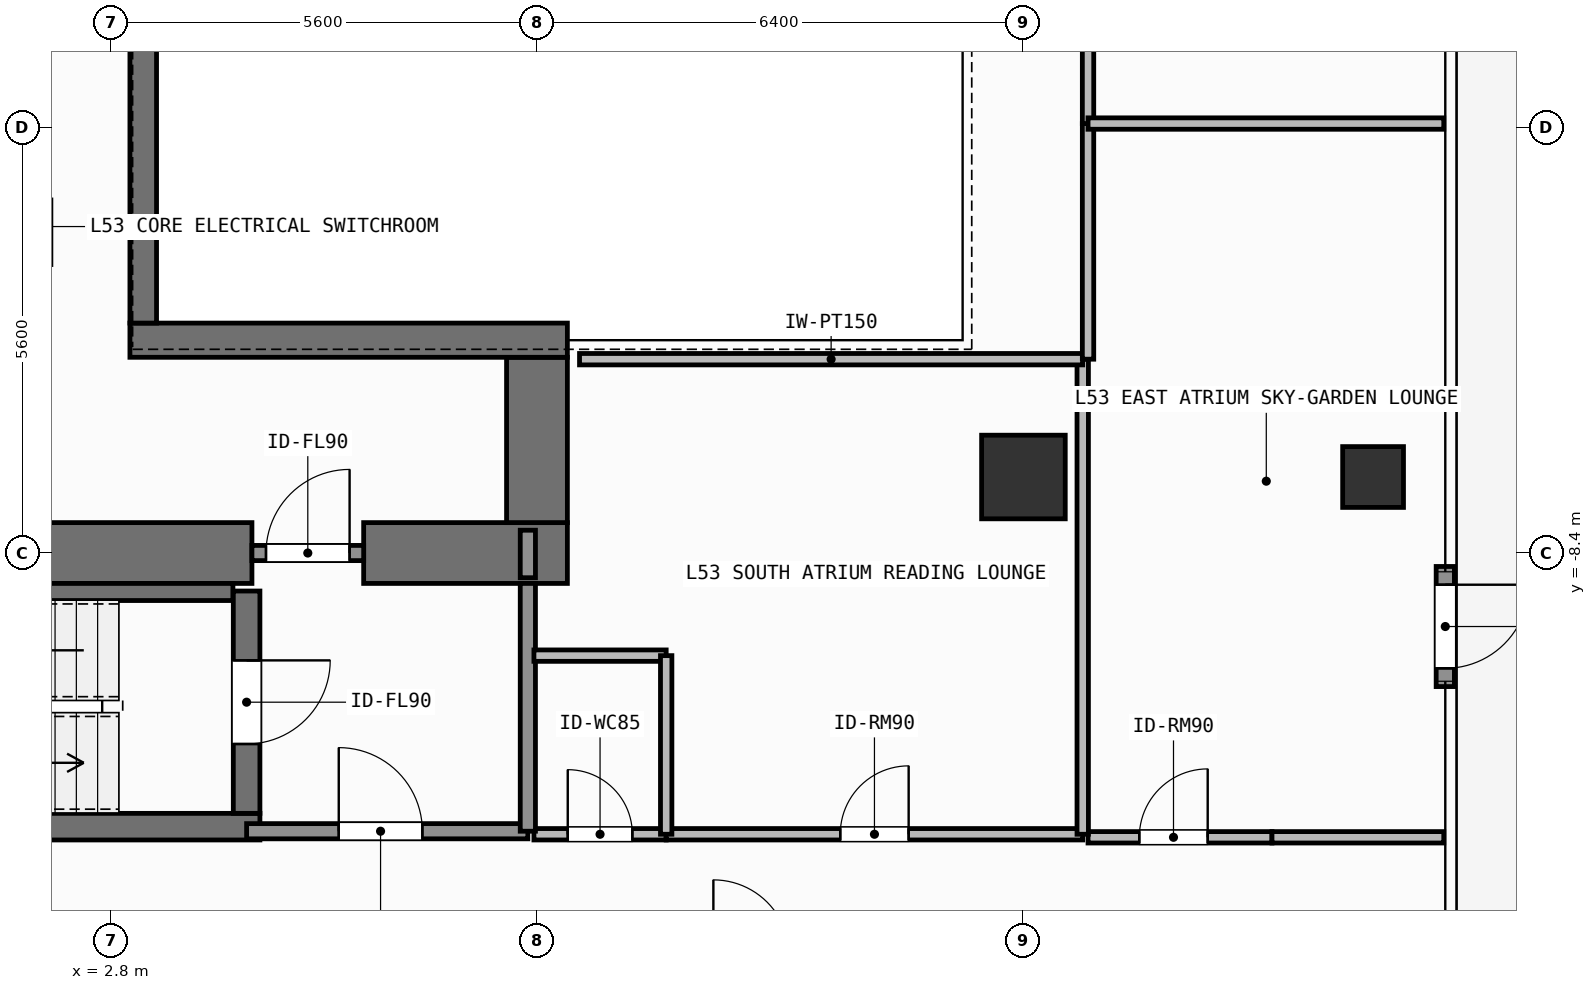
"""IFC4 building model, lengths in metres.
Left out: names, types, materials, properties, quantities, classifications, styles, units other than length and angle.
Written with IfcOpenShell. Run it as: python <this file> out.ifc"""

import sys

from ifc_helpers import new_model, si_unit, direction, frame, frame_2d, origin, origin_2d, place, context, subcontext, project, spatial, rectangle, hollow_rectangle, extrude, element, fill, save


model = new_model("IFC4")
c1 = context("Model", 3, precision=1e-05, world=origin(), true_north=direction((0.0, 1.0)))
c2 = subcontext(c1, "Body", "Model", "MODEL_VIEW")
j1 = project(units=[si_unit("LENGTHUNIT", "METRE"), si_unit("PLANEANGLEUNIT", "RADIAN")], contexts=[c1])
p1 = place(None, origin())
s1 = spatial("IfcSite", under=j1, at=p1, CompositionType="ELEMENT")
p2 = place(p1, origin())
s2 = spatial("IfcBuilding", under=s1, at=p2, CompositionType="ELEMENT")
p3 = place(p2, frame((0.0, 0.0, 215.7)))
s3 = spatial("IfcBuildingStorey", under=s2, at=p3, CompositionType="ELEMENT", Elevation=215.7)
p4 = place(p3, frame((-2.62, -8.4, 0.0), z_axis=(0.0, 0.0, 1.0), x_axis=(1.0, 0.0, 0.0)))
e1 = element("IfcWall", 1, at=p4, inside=s3, PredefinedType="SHEAR", context=c2, shape_type="SweptSolid", body=[
    extrude(rectangle(XDim=7.27, YDim=0.8, at=frame_2d((3.635, 0.0))), origin(), (0.0, 0.0, 1.0), 3.9),
])
p5 = place(p3, frame((6.12, -8.4, 0.0), z_axis=(0.0, 0.0, 1.0), x_axis=(1.0, 0.0, 0.0)))
e2 = element("IfcWall", 2, at=p5, inside=s3, PredefinedType="SHEAR", context=c2, shape_type="SweptSolid", body=[
    extrude(rectangle(XDim=2.68, YDim=0.8, at=frame_2d((1.34, 0.0))), origin(), (0.0, 0.0, 1.0), 3.9),
])
p6 = place(p3, frame((8.4, -8.0, 0.0), z_axis=(0.0, 0.0, 1.0), x_axis=(0.0, 1.0, 0.0)))
e3 = element("IfcWall", 3, at=p6, inside=s3, PredefinedType="SHEAR", context=c2, shape_type="SweptSolid", body=[
    extrude(rectangle(XDim=2.175, YDim=0.8, at=frame_2d((1.087, 0.0))), origin(), (0.0, 0.0, 1.0), 3.9),
])
p7 = place(p3, frame((3.045, -5.6, 0.0), z_axis=(0.0, 0.0, 1.0), x_axis=(1.0, 0.0, 0.0)))
e4 = element("IfcWall", 4, at=p7, inside=s3, PredefinedType="SHEAR", context=c2, shape_type="SweptSolid", body=[
    extrude(rectangle(XDim=5.755, YDim=0.45, at=frame_2d((2.877, 0.0))), origin(), (0.0, 0.0, 1.0), 3.9),
])
p8 = place(p3, frame((3.22, -5.375, 0.0), z_axis=(0.0, 0.0, 1.0), x_axis=(0.0, 1.0, 0.0)))
e5 = element("IfcWall", 5, at=p8, inside=s3, PredefinedType="SHEAR", context=c2, shape_type="SweptSolid", body=[
    extrude(rectangle(XDim=10.75, YDim=0.35, at=frame_2d((5.375, 0.0))), origin(), (0.0, 0.0, 1.0), 3.9),
])
p9 = place(p3, frame((-2.555, -12.0, 0.0), z_axis=(0.0, 0.0, 1.0), x_axis=(1.0, 0.0, 0.0)))
e6 = element("IfcWall", 6, at=p9, inside=s3, PredefinedType="SHEAR", context=c2, shape_type="SweptSolid", body=[
    extrude(rectangle(XDim=7.31, YDim=0.35, at=frame_2d((3.655, 0.0))), origin(), (0.0, 0.0, 1.0), 3.9),
])
p10 = place(p3, frame((-2.2, -8.913, 0.0), z_axis=(0.0, 0.0, 1.0), x_axis=(1.0, 0.0, 0.0)))
e7 = element("IfcWall", 7, at=p10, inside=s3, PredefinedType="SHEAR", context=c2, shape_type="SweptSolid", body=[
    extrude(rectangle(XDim=6.6, YDim=0.225, at=frame_2d((3.3, 0.0))), origin(), (0.0, 0.0, 1.0), 3.9),
])
p11 = place(p3, frame((4.58, -8.9, 0.0), z_axis=(0.0, 0.0, 1.0), x_axis=(0.0, -1.0, 0.0)))
e8 = element("IfcWall", 8, at=p11, inside=s3, PredefinedType="SHEAR", context=c2, shape_type="SweptSolid", body=[
    extrude(rectangle(XDim=2.925, YDim=0.35, at=frame_2d((1.462, 0.0))), origin(), (0.0, 0.0, 1.0), 3.9),
])
p12 = place(p11, frame((0.913, 0.0, 0.0)))
e9 = element("IfcOpeningElement", 9, at=p12, cuts=e8, PredefinedType="OPENING", context=c2, shape_type="SweptSolid", body=[
    extrude(rectangle(XDim=1.1, YDim=2.15, at=frame_2d((0.55, 1.075))), frame((0.0, 0.185, 0.0), z_axis=(0.0, -1.0, 0.0), x_axis=(1.0, 0.0, 0.0)), (0.0, 0.0, 1.0), 0.37),
])
p13 = place(p3, frame((14.8, -7.4, 0.0), z_axis=(0.0, 0.0, 1.0), x_axis=(1.0, 0.0, 0.0)))
e10 = element("IfcColumn", 10, at=p13, inside=s3, PredefinedType="COLUMN", context=c2, shape_type="SweptSolid", body=[
    extrude(rectangle(XDim=1.1, YDim=1.1, at=origin_2d()), origin(), (0.0, 0.0, 1.0), 3.9),
])
p14 = place(p3, frame((19.4, -7.4, 0.0), z_axis=(0.0, 0.0, 1.0), x_axis=(1.0, 0.0, 0.0)))
e11 = element("IfcColumn", 11, at=p14, inside=s3, PredefinedType="COLUMN", context=c2, shape_type="SweptSolid", body=[
    extrude(hollow_rectangle(XDim=0.8, YDim=0.8, WallThickness=0.036, at=origin_2d()), origin(), (0.0, 0.0, 1.0), 3.9),
])
p15 = place(p3, frame((20.35, -8.577, 0.0), z_axis=(0.0, 0.0, 1.0), x_axis=(0.0, -1.0, 0.0)))
e12 = element("IfcWall", 12, at=p15, inside=s3, PredefinedType="SOLIDWALL", context=c2, shape_type="SweptSolid", body=[
    extrude(rectangle(XDim=1.58, YDim=0.24, at=frame_2d((0.79, 0.0))), origin(), (0.0, 0.0, 1.0), 3.62),
])
p16 = place(p15, frame((0.24, 0.0, 0.0)))
e13 = element("IfcOpeningElement", 13, at=p16, cuts=e12, PredefinedType="OPENING", context=c2, shape_type="SweptSolid", body=[
    extrude(rectangle(XDim=1.1, YDim=2.2, at=frame_2d((0.55, 1.1))), frame((0.0, 0.13, 0.0), z_axis=(0.0, -1.0, 0.0), x_axis=(1.0, 0.0, 0.0)), (0.0, 0.0, 1.0), 0.26),
])
p17 = place(p3, frame((4.58, -12.06, 0.0), z_axis=(0.0, 0.0, 1.0), x_axis=(1.0, 0.0, 0.0)))
e14 = element("IfcWall", 14, at=p17, inside=s3, PredefinedType="SOLIDWALL", context=c2, shape_type="SweptSolid", body=[
    extrude(rectangle(XDim=3.7, YDim=0.2, at=frame_2d((1.85, 0.0))), origin(), (0.0, 0.0, 1.0), 3.62),
])
p18 = place(p17, frame((1.212, 0.0, 0.0)))
e15 = element("IfcOpeningElement", 15, at=p18, cuts=e14, PredefinedType="OPENING", context=c2, shape_type="SweptSolid", body=[
    extrude(rectangle(XDim=1.1, YDim=2.15, at=frame_2d((0.55, 1.075))), frame((0.0, 0.11, 0.0), z_axis=(0.0, -1.0, 0.0), x_axis=(1.0, 0.0, 0.0)), (0.0, 0.0, 1.0), 0.22),
])
p19 = place(p3, frame((4.65, -8.4, 0.0), z_axis=(0.0, 0.0, 1.0), x_axis=(1.0, 0.0, 0.0)))
e16 = element("IfcWall", 16, at=p19, inside=s3, PredefinedType="SOLIDWALL", context=c2, shape_type="SweptSolid", body=[
    extrude(rectangle(XDim=1.47, YDim=0.2, at=frame_2d((0.735, 0.0))), origin(), (0.0, 0.0, 1.0), 2.76),
])
p20 = place(p19, frame((0.185, 0.0, 0.0)))
e17 = element("IfcOpeningElement", 17, at=p20, cuts=e16, PredefinedType="OPENING", context=c2, shape_type="SweptSolid", body=[
    extrude(rectangle(XDim=1.1, YDim=2.15, at=frame_2d((0.55, 1.075))), frame((0.0, 0.11, 0.0), z_axis=(0.0, -1.0, 0.0), x_axis=(1.0, 0.0, 0.0)), (0.0, 0.0, 1.0), 0.22),
])
p21 = place(p3, frame((8.36, -12.1, 0.0), z_axis=(0.0, 0.0, 1.0), x_axis=(1.0, 0.0, 0.0)))
e18 = element("IfcWall", 18, at=p21, inside=s3, PredefinedType="PARTITIONING", context=c2, shape_type="SweptSolid", body=[
    extrude(rectangle(XDim=1.74, YDim=0.15, at=frame_2d((0.87, 0.0))), origin(), (0.0, 0.0, 1.0), 3.62),
])
p22 = place(p21, frame((0.445, 0.0, 0.0)))
e19 = element("IfcOpeningElement", 19, at=p22, cuts=e18, PredefinedType="OPENING", context=c2, shape_type="SweptSolid", body=[
    extrude(rectangle(XDim=0.85, YDim=2.1, at=frame_2d((0.425, 1.05))), frame((0.0, 0.085, 0.0), z_axis=(0.0, -1.0, 0.0), x_axis=(1.0, 0.0, 0.0)), (0.0, 0.0, 1.0), 0.17),
])
p23 = place(p3, frame((10.1, -12.1, 0.0), z_axis=(0.0, 0.0, 1.0), x_axis=(1.0, 0.0, 0.0)))
e20 = element("IfcWall", 20, at=p23, inside=s3, PredefinedType="PARTITIONING", context=c2, shape_type="SweptSolid", body=[
    extrude(rectangle(XDim=5.48, YDim=0.15, at=frame_2d((2.74, 0.0))), origin(), (0.0, 0.0, 1.0), 3.62),
])
p24 = place(p23, frame((2.29, 0.0, 0.0)))
e21 = element("IfcOpeningElement", 21, at=p24, cuts=e20, PredefinedType="OPENING", context=c2, shape_type="SweptSolid", body=[
    extrude(rectangle(XDim=0.9, YDim=2.1, at=frame_2d((0.45, 1.05))), frame((0.0, 0.085, 0.0), z_axis=(0.0, -1.0, 0.0), x_axis=(1.0, 0.0, 0.0)), (0.0, 0.0, 1.0), 0.17),
])
p25 = place(p3, frame((15.65, -12.14, 0.0), z_axis=(0.0, 0.0, 1.0), x_axis=(1.0, 0.0, 0.0)))
e22 = element("IfcWall", 22, at=p25, inside=s3, PredefinedType="PARTITIONING", context=c2, shape_type="SweptSolid", body=[
    extrude(rectangle(XDim=2.42, YDim=0.15, at=frame_2d((1.21, 0.0))), origin(), (0.0, 0.0, 1.0), 3.62),
])
p26 = place(p25, frame((0.674, 0.0, 0.0)))
e23 = element("IfcOpeningElement", 23, at=p26, cuts=e22, PredefinedType="OPENING", context=c2, shape_type="SweptSolid", body=[
    extrude(rectangle(XDim=0.9, YDim=2.1, at=frame_2d((0.45, 1.05))), frame((0.0, 0.085, 0.0), z_axis=(0.0, -1.0, 0.0), x_axis=(1.0, 0.0, 0.0)), (0.0, 0.0, 1.0), 0.17),
])
p27 = place(p3, frame((8.28, -12.06, 0.0), z_axis=(0.0, 0.0, 1.0), x_axis=(0.0, 1.0, 0.0)))
e24 = element("IfcWall", 24, at=p27, inside=s3, PredefinedType="SOLIDWALL", context=c2, shape_type="SweptSolid", body=[
    extrude(rectangle(XDim=3.26, YDim=0.2, at=frame_2d((1.63, 0.0))), origin(), (0.0, 0.0, 1.0), 3.62),
])
p28 = place(p3, frame((8.28, -8.725, 0.0), z_axis=(0.0, 0.0, 1.0), x_axis=(0.0, 1.0, 0.0)))
e25 = element("IfcWall", 25, at=p28, inside=s3, PredefinedType="SOLIDWALL", context=c2, shape_type="SweptSolid", body=[
    extrude(rectangle(XDim=0.625, YDim=0.2, at=frame_2d((0.312, 0.0))), origin(), (0.0, 0.0, 1.0), 3.62),
])
p29 = place(p3, frame((8.36, -9.75, 0.0), z_axis=(0.0, 0.0, 1.0), x_axis=(1.0, 0.0, 0.0)))
e26 = element("IfcWall", 26, at=p29, inside=s3, PredefinedType="PARTITIONING", context=c2, shape_type="SweptSolid", body=[
    extrude(rectangle(XDim=1.74, YDim=0.15, at=frame_2d((0.87, 0.0))), origin(), (0.0, 0.0, 1.0), 3.62),
])
p30 = place(p3, frame((10.1, -12.1, 0.0), z_axis=(0.0, 0.0, 1.0), x_axis=(0.0, 1.0, 0.0)))
e27 = element("IfcWall", 27, at=p30, inside=s3, PredefinedType="PARTITIONING", context=c2, shape_type="SweptSolid", body=[
    extrude(rectangle(XDim=2.35, YDim=0.15, at=frame_2d((1.175, 0.0))), origin(), (0.0, 0.0, 1.0), 3.62),
])
p31 = place(p3, frame((15.58, -12.1, 0.0), z_axis=(0.0, 0.0, 1.0), x_axis=(0.0, 1.0, 0.0)))
e28 = element("IfcWall", 28, at=p31, inside=s3, PredefinedType="PARTITIONING", context=c2, shape_type="SweptSolid", body=[
    extrude(rectangle(XDim=6.25, YDim=0.15, at=frame_2d((3.125, 0.0))), origin(), (0.0, 0.0, 1.0), 3.62),
])
p32 = place(p3, frame((8.96, -5.85, 0.0), z_axis=(0.0, 0.0, 1.0), x_axis=(1.0, 0.0, 0.0)))
e29 = element("IfcWall", 29, at=p32, inside=s3, PredefinedType="PARTITIONING", context=c2, shape_type="SweptSolid", body=[
    extrude(rectangle(XDim=6.62, YDim=0.15, at=frame_2d((3.31, 0.0))), origin(), (0.0, 0.0, 1.0), 3.62),
])
p33 = place(p3, frame((15.65, -5.85, 0.0), z_axis=(0.0, 0.0, 1.0), x_axis=(0.0, 1.0, 0.0)))
e30 = element("IfcWall", 30, at=p33, inside=s3, PredefinedType="PARTITIONING", context=c2, shape_type="SweptSolid", body=[
    extrude(rectangle(XDim=3.1, YDim=0.15, at=frame_2d((1.55, 0.0))), origin(), (0.0, 0.0, 1.0), 3.62),
])
p34 = place(p3, frame((15.65, -2.75, 0.0), z_axis=(0.0, 0.0, 1.0), x_axis=(0.0, 1.0, 0.0)))
e31 = element("IfcWall", 31, at=p34, inside=s3, PredefinedType="PARTITIONING", context=c2, shape_type="SweptSolid", body=[
    extrude(rectangle(XDim=8.6, YDim=0.15, at=frame_2d((4.3, 0.0))), origin(), (0.0, 0.0, 1.0), 3.62),
])
p35 = place(p3, frame((15.65, -2.75, 0.0), z_axis=(0.0, 0.0, 1.0), x_axis=(1.0, 0.0, 0.0)))
e32 = element("IfcWall", 32, at=p35, inside=s3, PredefinedType="PARTITIONING", context=c2, shape_type="SweptSolid", body=[
    extrude(rectangle(XDim=4.68, YDim=0.15, at=frame_2d((2.34, 0.0))), origin(), (0.0, 0.0, 1.0), 3.62),
])
p36 = place(p3, frame((18.07, -12.14, 0.0), z_axis=(0.0, 0.0, 1.0), x_axis=(1.0, 0.0, 0.0)))
e33 = element("IfcWall", 33, at=p36, inside=s3, PredefinedType="PARTITIONING", context=c2, shape_type="SweptSolid", body=[
    extrude(rectangle(XDim=2.26, YDim=0.15, at=frame_2d((1.13, 0.0))), origin(), (0.0, 0.0, 1.0), 3.62),
])
p37 = place(p16, origin())
e34 = element("IfcDoor", 34, at=p37, inside=s3, OperationType="SINGLE_SWING_LEFT", PredefinedType="DOOR", context=c2, shape_type="SweptSolid", body=[
    extrude(rectangle(XDim=1.1, YDim=2.2, at=frame_2d((0.55, 1.1))), frame((0.0, 0.025, 0.0), z_axis=(0.0, -1.0, 0.0), x_axis=(1.0, 0.0, 0.0)), (0.0, 0.0, 1.0), 0.05),
])
fill(e13, e34)
p38 = place(p12, origin())
e35 = element("IfcDoor", 35, at=p38, inside=s3, OperationType="SINGLE_SWING_LEFT", PredefinedType="DOOR", context=c2, shape_type="SweptSolid", body=[
    extrude(rectangle(XDim=1.1, YDim=2.15, at=frame_2d((0.55, 1.075))), frame((0.0, 0.025, 0.0), z_axis=(0.0, -1.0, 0.0), x_axis=(1.0, 0.0, 0.0)), (0.0, 0.0, 1.0), 0.05),
])
fill(e9, e35)
p39 = place(p18, origin())
e36 = element("IfcDoor", 36, at=p39, inside=s3, OperationType="SINGLE_SWING_LEFT", PredefinedType="DOOR", context=c2, shape_type="SweptSolid", body=[
    extrude(rectangle(XDim=1.1, YDim=2.15, at=frame_2d((0.55, 1.075))), frame((0.0, 0.025, 0.0), z_axis=(0.0, -1.0, 0.0), x_axis=(1.0, 0.0, 0.0)), (0.0, 0.0, 1.0), 0.05),
])
fill(e15, e36)
p40 = place(p20, origin())
e37 = element("IfcDoor", 37, at=p40, inside=s3, OperationType="SINGLE_SWING_RIGHT", PredefinedType="DOOR", context=c2, shape_type="SweptSolid", body=[
    extrude(rectangle(XDim=1.1, YDim=2.15, at=frame_2d((0.55, 1.075))), frame((0.0, 0.025, 0.0), z_axis=(0.0, -1.0, 0.0), x_axis=(1.0, 0.0, 0.0)), (0.0, 0.0, 1.0), 0.05),
])
fill(e17, e37)
p41 = place(p22, origin())
e38 = element("IfcDoor", 38, at=p41, inside=s3, OperationType="SINGLE_SWING_LEFT", PredefinedType="DOOR", context=c2, shape_type="SweptSolid", body=[
    extrude(rectangle(XDim=0.85, YDim=2.1, at=frame_2d((0.425, 1.05))), frame((0.0, 0.025, 0.0), z_axis=(0.0, -1.0, 0.0), x_axis=(1.0, 0.0, 0.0)), (0.0, 0.0, 1.0), 0.05),
])
fill(e19, e38)
p42 = place(p24, origin())
e39 = element("IfcDoor", 39, at=p42, inside=s3, OperationType="SINGLE_SWING_RIGHT", PredefinedType="DOOR", context=c2, shape_type="SweptSolid", body=[
    extrude(rectangle(XDim=0.9, YDim=2.1, at=frame_2d((0.45, 1.05))), frame((0.0, 0.025, 0.0), z_axis=(0.0, -1.0, 0.0), x_axis=(1.0, 0.0, 0.0)), (0.0, 0.0, 1.0), 0.05),
])
fill(e21, e39)
p43 = place(p26, origin())
e40 = element("IfcDoor", 40, at=p43, inside=s3, OperationType="SINGLE_SWING_RIGHT", PredefinedType="DOOR", context=c2, shape_type="SweptSolid", body=[
    extrude(rectangle(XDim=0.9, YDim=2.1, at=frame_2d((0.45, 1.05))), frame((0.0, 0.025, 0.0), z_axis=(0.0, -1.0, 0.0), x_axis=(1.0, 0.0, 0.0)), (0.0, 0.0, 1.0), 0.05),
])
fill(e23, e40)
save(model, sys.argv[1])
